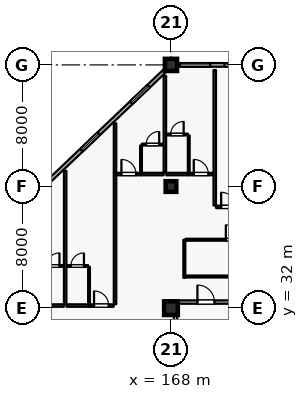
"""IFC4 building model, lengths in metres.
Left out: names, types, materials, properties, quantities, classifications, styles, units other than length and angle.
Written with IfcOpenShell. Run it as: python <this file> out.ifc"""

import sys

from ifc_helpers import new_model, si_unit, direction, frame, frame_2d, origin, origin_2d, place, context, subcontext, project, spatial, rectangle, extrude, element, fill, save


model = new_model("IFC4")
c1 = context("Model", 3, precision=1e-05, world=origin(), true_north=direction((0.0, 1.0)))
c2 = subcontext(c1, "Body", "Model", "MODEL_VIEW")
j1 = project(units=[si_unit("LENGTHUNIT", "METRE"), si_unit("PLANEANGLEUNIT", "RADIAN")], contexts=[c1])
p1 = place(None, origin())
s1 = spatial("IfcSite", under=j1, at=p1, CompositionType="ELEMENT")
p2 = place(p1, origin())
s2 = spatial("IfcBuilding", under=s1, at=p2, CompositionType="ELEMENT")
p3 = place(p2, frame((0.0, 0.0, 16.2)))
s3 = spatial("IfcBuildingStorey", under=s2, at=p3, CompositionType="ELEMENT", Elevation=16.2)
p4 = place(p3, frame((168.0, 32.0, 0.0), z_axis=(0.0, 0.0, 1.0), x_axis=(1.0, 0.0, 0.0)))
e1 = element("IfcColumn", 1, at=p4, inside=s3, PredefinedType="COLUMN", context=c2, shape_type="SweptSolid", body=[
    extrude(rectangle(XDim=0.9, YDim=0.9, at=origin_2d()), origin(), (0.0, 0.0, 1.0), 4.8),
])
p5 = place(p3, frame((168.0, 48.0, 0.0), z_axis=(0.0, 0.0, 1.0), x_axis=(1.0, 0.0, 0.0)))
e2 = element("IfcColumn", 2, at=p5, inside=s3, PredefinedType="COLUMN", context=c2, shape_type="SweptSolid", body=[
    extrude(rectangle(XDim=0.8, YDim=0.8, at=origin_2d()), origin(), (0.0, 0.0, 1.0), 4.8),
])
p6 = place(p3, frame((168.0, 40.0, 0.0), z_axis=(0.0, 0.0, 1.0), x_axis=(1.0, 0.0, 0.0)))
e3 = element("IfcColumn", 3, at=p6, inside=s3, PredefinedType="COLUMN", context=c2, shape_type="SweptSolid", body=[
    extrude(rectangle(XDim=0.7, YDim=0.7, at=origin_2d()), origin(), (0.0, 0.0, 1.0), 4.8),
])
p7 = place(p3, frame((160.0, 40.381, 0.0), z_axis=(0.0, 0.0, 1.0), x_axis=(0.724156739794, 0.689635422677, 0.0)))
e4 = element("IfcWall", 4, at=p7, inside=s3, PredefinedType="SOLIDWALL", context=c2, shape_type="SweptSolid", body=[
    extrude(rectangle(XDim=10.495, YDim=0.24, at=frame_2d((5.248, 0.0))), origin(), (0.0, 0.0, 1.0), 4.13),
])
p8 = place(p7, frame((2.901, 0.0, 0.8)))
e5 = element("IfcOpeningElement", 5, at=p8, cuts=e4, PredefinedType="OPENING", context=c2, shape_type="SweptSolid", body=[
    extrude(rectangle(XDim=1.6, YDim=1.6, at=frame_2d((0.8, 0.8))), frame((0.0, 0.13, 0.0), z_axis=(0.0, -1.0, 0.0), x_axis=(1.0, 0.0, 0.0)), (0.0, 0.0, 1.0), 0.26),
])
p9 = place(p7, frame((7.43, 0.0, 0.8)))
e6 = element("IfcOpeningElement", 6, at=p9, cuts=e4, PredefinedType="OPENING", context=c2, shape_type="SweptSolid", body=[
    extrude(rectangle(XDim=1.6, YDim=1.6, at=frame_2d((0.8, 0.8))), frame((0.0, 0.13, 0.0), z_axis=(0.0, -1.0, 0.0), x_axis=(1.0, 0.0, 0.0)), (0.0, 0.0, 1.0), 0.26),
])
p10 = place(p3, frame((168.4, 48.0, 0.0), z_axis=(0.0, 0.0, 1.0), x_axis=(1.0, 0.0, 0.0)))
e7 = element("IfcWall", 7, at=p10, inside=s3, PredefinedType="SOLIDWALL", context=c2, shape_type="SweptSolid", body=[
    extrude(rectangle(XDim=7.6, YDim=0.24, at=frame_2d((3.8, 0.0))), origin(), (0.0, 0.0, 1.0), 4.13),
])
p11 = place(p10, frame((0.19, 0.0, 0.8)))
e8 = element("IfcOpeningElement", 8, at=p11, cuts=e7, PredefinedType="OPENING", context=c2, shape_type="SweptSolid", body=[
    extrude(rectangle(XDim=2.0, YDim=1.75, at=frame_2d((1.0, 0.875))), frame((0.0, 0.13, 0.0), z_axis=(0.0, -1.0, 0.0), x_axis=(1.0, 0.0, 0.0)), (0.0, 0.0, 1.0), 0.26),
])
p12 = place(p10, frame((3.12, 0.0, 0.8)))
e9 = element("IfcOpeningElement", 9, at=p12, cuts=e7, PredefinedType="OPENING", context=c2, shape_type="SweptSolid", body=[
    extrude(rectangle(XDim=2.0, YDim=1.75, at=frame_2d((1.0, 0.875))), frame((0.0, 0.13, 0.0), z_axis=(0.0, -1.0, 0.0), x_axis=(1.0, 0.0, 0.0)), (0.0, 0.0, 1.0), 0.26),
])
p13 = place(p10, frame((6.03, 0.0, 0.8)))
e10 = element("IfcOpeningElement", 10, at=p13, cuts=e7, PredefinedType="OPENING", context=c2, shape_type="SweptSolid", body=[
    extrude(rectangle(XDim=1.4, YDim=1.6, at=frame_2d((0.7, 0.8))), frame((0.0, 0.13, 0.0), z_axis=(0.0, -1.0, 0.0), x_axis=(1.0, 0.0, 0.0)), (0.0, 0.0, 1.0), 0.26),
])
p14 = place(p3, frame((168.3, 29.365, 0.0), z_axis=(0.0, 0.0, 1.0), x_axis=(0.0, 1.0, 0.0)))
e11 = element("IfcWall", 11, at=p14, inside=s3, PredefinedType="PARTITIONING", context=c2, shape_type="SweptSolid", body=[
    extrude(rectangle(XDim=2.92, YDim=0.22, at=frame_2d((1.46, 0.0))), origin(), (0.0, 0.0, 1.0), 4.535),
])
p15 = place(p3, frame((168.19, 32.4, 0.0), z_axis=(0.0, 0.0, 1.0), x_axis=(1.0, 0.0, 0.0)))
e12 = element("IfcWall", 12, at=p15, inside=s3, PredefinedType="PARTITIONING", context=c2, shape_type="SweptSolid", body=[
    extrude(rectangle(XDim=4.22, YDim=0.22, at=frame_2d((2.11, 0.0))), origin(), (0.0, 0.0, 1.0), 4.535),
])
p16 = place(p15, frame((1.55, 0.0, 0.0)))
e13 = element("IfcOpeningElement", 13, at=p16, cuts=e12, PredefinedType="OPENING", context=c2, shape_type="SweptSolid", body=[
    extrude(rectangle(XDim=1.12, YDim=2.2, at=frame_2d((0.56, 1.1))), frame((0.0, 0.12, 0.0), z_axis=(0.0, -1.0, 0.0), x_axis=(1.0, 0.0, 0.0)), (0.0, 0.0, 1.0), 0.24),
])
p17 = place(p3, frame((159.48, 32.17, 0.0), z_axis=(0.0, 0.0, 1.0), x_axis=(1.0, 0.0, 0.0)))
e14 = element("IfcWall", 14, at=p17, inside=s3, PredefinedType="PARTITIONING", context=c2, shape_type="SweptSolid", body=[
    extrude(rectangle(XDim=1.47, YDim=0.16, at=frame_2d((0.735, 0.0))), origin(), (0.0, 0.0, 1.0), 4.535),
])
p18 = place(p3, frame((159.53, 34.77, 0.0), z_axis=(0.0, 0.0, 1.0), x_axis=(1.0, 0.0, 0.0)))
e15 = element("IfcWall", 15, at=p18, inside=s3, PredefinedType="PARTITIONING", context=c2, shape_type="SweptSolid", body=[
    extrude(rectangle(XDim=1.41, YDim=0.115, at=frame_2d((0.705, 0.0))), origin(), (0.0, 0.0, 1.0), 4.535),
])
p19 = place(p18, frame((0.275, 0.0, 0.0)))
e16 = element("IfcOpeningElement", 16, at=p19, cuts=e15, PredefinedType="OPENING", context=c2, shape_type="SweptSolid", body=[
    extrude(rectangle(XDim=0.86, YDim=2.12, at=frame_2d((0.43, 1.06))), frame((0.0, 0.067, 0.0), z_axis=(0.0, -1.0, 0.0), x_axis=(1.0, 0.0, 0.0)), (0.0, 0.0, 1.0), 0.135),
])
p20 = place(p3, frame((161.13, 32.17, 0.0), z_axis=(0.0, 0.0, 1.0), x_axis=(1.0, 0.0, 0.0)))
e17 = element("IfcWall", 17, at=p20, inside=s3, PredefinedType="PARTITIONING", context=c2, shape_type="SweptSolid", body=[
    extrude(rectangle(XDim=1.47, YDim=0.16, at=frame_2d((0.735, 0.0))), origin(), (0.0, 0.0, 1.0), 4.535),
])
p21 = place(p3, frame((162.61, 32.17, 0.0), z_axis=(0.0, 0.0, 1.0), x_axis=(1.0, 0.0, 0.0)))
e18 = element("IfcWall", 18, at=p21, inside=s3, PredefinedType="PARTITIONING", context=c2, shape_type="SweptSolid", body=[
    extrude(rectangle(XDim=1.62, YDim=0.16, at=frame_2d((0.81, 0.0))), origin(), (0.0, 0.0, 1.0), 4.535),
])
p22 = place(p21, frame((0.33, 0.0, 0.0)))
e19 = element("IfcOpeningElement", 19, at=p22, cuts=e18, PredefinedType="OPENING", context=c2, shape_type="SweptSolid", body=[
    extrude(rectangle(XDim=0.96, YDim=2.2, at=frame_2d((0.48, 1.1))), frame((0.0, 0.09, 0.0), z_axis=(0.0, -1.0, 0.0), x_axis=(1.0, 0.0, 0.0)), (0.0, 0.0, 1.0), 0.18),
])
p23 = place(p3, frame((162.61, 32.26, 0.0), z_axis=(0.0, 0.0, 1.0), x_axis=(0.0, 1.0, 0.0)))
e20 = element("IfcWall", 20, at=p23, inside=s3, PredefinedType="PARTITIONING", context=c2, shape_type="SweptSolid", body=[
    extrude(rectangle(XDim=2.45, YDim=0.115, at=frame_2d((1.225, 0.0))), origin(), (0.0, 0.0, 1.0), 4.535),
])
p24 = place(p3, frame((161.14, 34.77, 0.0), z_axis=(0.0, 0.0, 1.0), x_axis=(1.0, 0.0, 0.0)))
e21 = element("IfcWall", 21, at=p24, inside=s3, PredefinedType="PARTITIONING", context=c2, shape_type="SweptSolid", body=[
    extrude(rectangle(XDim=1.41, YDim=0.115, at=frame_2d((0.705, 0.0))), origin(), (0.0, 0.0, 1.0), 4.535),
])
p25 = place(p24, frame((0.275, 0.0, 0.0)))
e22 = element("IfcOpeningElement", 22, at=p25, cuts=e21, PredefinedType="OPENING", context=c2, shape_type="SweptSolid", body=[
    extrude(rectangle(XDim=0.86, YDim=2.12, at=frame_2d((0.43, 1.06))), frame((0.0, 0.067, 0.0), z_axis=(0.0, -1.0, 0.0), x_axis=(1.0, 0.0, 0.0)), (0.0, 0.0, 1.0), 0.135),
])
p26 = place(p3, frame((161.04, 32.26, 0.0), z_axis=(0.0, 0.0, 1.0), x_axis=(0.0, 1.0, 0.0)))
e23 = element("IfcWall", 23, at=p26, inside=s3, PredefinedType="PARTITIONING", context=c2, shape_type="SweptSolid", body=[
    extrude(rectangle(XDim=8.77, YDim=0.16, at=frame_2d((4.385, 0.0))), origin(), (0.0, 0.0, 1.0), 4.535),
])
p27 = place(p3, frame((164.32, 32.26, 0.0), z_axis=(0.0, 0.0, 1.0), x_axis=(0.0, 1.0, 0.0)))
e24 = element("IfcWall", 24, at=p27, inside=s3, PredefinedType="PARTITIONING", context=c2, shape_type="SweptSolid", body=[
    extrude(rectangle(XDim=8.64, YDim=0.16, at=frame_2d((4.32, 0.0))), origin(), (0.0, 0.0, 1.0), 4.535),
])
p28 = place(p3, frame((164.41, 40.82, 0.0), z_axis=(0.0, 0.0, 1.0), x_axis=(1.0, 0.0, 0.0)))
e25 = element("IfcWall", 25, at=p28, inside=s3, PredefinedType="PARTITIONING", context=c2, shape_type="SweptSolid", body=[
    extrude(rectangle(XDim=1.62, YDim=0.16, at=frame_2d((0.81, 0.0))), origin(), (0.0, 0.0, 1.0), 4.535),
])
p29 = place(p28, frame((0.33, 0.0, 0.0)))
e26 = element("IfcOpeningElement", 26, at=p29, cuts=e25, PredefinedType="OPENING", context=c2, shape_type="SweptSolid", body=[
    extrude(rectangle(XDim=0.96, YDim=2.2, at=frame_2d((0.48, 1.1))), frame((0.0, 0.09, 0.0), z_axis=(0.0, -1.0, 0.0), x_axis=(1.0, 0.0, 0.0)), (0.0, 0.0, 1.0), 0.18),
])
p30 = place(p3, frame((166.04, 40.82, 0.0), z_axis=(0.0, 0.0, 1.0), x_axis=(1.0, 0.0, 0.0)))
e27 = element("IfcWall", 27, at=p30, inside=s3, PredefinedType="PARTITIONING", context=c2, shape_type="SweptSolid", body=[
    extrude(rectangle(XDim=1.47, YDim=0.16, at=frame_2d((0.735, 0.0))), origin(), (0.0, 0.0, 1.0), 4.535),
])
p31 = place(p3, frame((166.03, 40.91, 0.0), z_axis=(0.0, 0.0, 1.0), x_axis=(0.0, 1.0, 0.0)))
e28 = element("IfcWall", 28, at=p31, inside=s3, PredefinedType="PARTITIONING", context=c2, shape_type="SweptSolid", body=[
    extrude(rectangle(XDim=1.79, YDim=0.115, at=frame_2d((0.895, 0.0))), origin(), (0.0, 0.0, 1.0), 4.535),
])
p32 = place(p3, frame((166.09, 42.76, 0.0), z_axis=(0.0, 0.0, 1.0), x_axis=(1.0, 0.0, 0.0)))
e29 = element("IfcWall", 29, at=p32, inside=s3, PredefinedType="PARTITIONING", context=c2, shape_type="SweptSolid", body=[
    extrude(rectangle(XDim=1.41, YDim=0.115, at=frame_2d((0.705, 0.0))), origin(), (0.0, 0.0, 1.0), 4.535),
])
p33 = place(p32, frame((0.275, 0.0, 0.0)))
e30 = element("IfcOpeningElement", 30, at=p33, cuts=e29, PredefinedType="OPENING", context=c2, shape_type="SweptSolid", body=[
    extrude(rectangle(XDim=0.86, YDim=2.12, at=frame_2d((0.43, 1.06))), frame((0.0, 0.067, 0.0), z_axis=(0.0, -1.0, 0.0), x_axis=(1.0, 0.0, 0.0)), (0.0, 0.0, 1.0), 0.135),
])
p34 = place(p3, frame((164.32, 40.91, 0.0), z_axis=(0.0, 0.0, 1.0), x_axis=(0.0, 1.0, 0.0)))
e31 = element("IfcWall", 31, at=p34, inside=s3, PredefinedType="PARTITIONING", context=c2, shape_type="SweptSolid", body=[
    extrude(rectangle(XDim=3.25, YDim=0.16, at=frame_2d((1.625, 0.0))), origin(), (0.0, 0.0, 1.0), 4.535),
])
p35 = place(p3, frame((167.69, 40.82, 0.0), z_axis=(0.0, 0.0, 1.0), x_axis=(1.0, 0.0, 0.0)))
e32 = element("IfcWall", 32, at=p35, inside=s3, PredefinedType="PARTITIONING", context=c2, shape_type="SweptSolid", body=[
    extrude(rectangle(XDim=1.47, YDim=0.16, at=frame_2d((0.735, 0.0))), origin(), (0.0, 0.0, 1.0), 4.535),
])
p36 = place(p3, frame((169.17, 40.82, 0.0), z_axis=(0.0, 0.0, 1.0), x_axis=(1.0, 0.0, 0.0)))
e33 = element("IfcWall", 33, at=p36, inside=s3, PredefinedType="PARTITIONING", context=c2, shape_type="SweptSolid", body=[
    extrude(rectangle(XDim=1.62, YDim=0.16, at=frame_2d((0.81, 0.0))), origin(), (0.0, 0.0, 1.0), 4.535),
])
p37 = place(p36, frame((0.33, 0.0, 0.0)))
e34 = element("IfcOpeningElement", 34, at=p37, cuts=e33, PredefinedType="OPENING", context=c2, shape_type="SweptSolid", body=[
    extrude(rectangle(XDim=0.96, YDim=2.2, at=frame_2d((0.48, 1.1))), frame((0.0, 0.09, 0.0), z_axis=(0.0, -1.0, 0.0), x_axis=(1.0, 0.0, 0.0)), (0.0, 0.0, 1.0), 0.18),
])
p38 = place(p3, frame((169.17, 40.91, 0.0), z_axis=(0.0, 0.0, 1.0), x_axis=(0.0, 1.0, 0.0)))
e35 = element("IfcWall", 35, at=p38, inside=s3, PredefinedType="PARTITIONING", context=c2, shape_type="SweptSolid", body=[
    extrude(rectangle(XDim=2.45, YDim=0.115, at=frame_2d((1.225, 0.0))), origin(), (0.0, 0.0, 1.0), 4.535),
])
p39 = place(p3, frame((167.7, 43.42, 0.0), z_axis=(0.0, 0.0, 1.0), x_axis=(1.0, 0.0, 0.0)))
e36 = element("IfcWall", 36, at=p39, inside=s3, PredefinedType="PARTITIONING", context=c2, shape_type="SweptSolid", body=[
    extrude(rectangle(XDim=1.41, YDim=0.115, at=frame_2d((0.705, 0.0))), origin(), (0.0, 0.0, 1.0), 4.535),
])
p40 = place(p39, frame((0.275, 0.0, 0.0)))
e37 = element("IfcOpeningElement", 37, at=p40, cuts=e36, PredefinedType="OPENING", context=c2, shape_type="SweptSolid", body=[
    extrude(rectangle(XDim=0.86, YDim=2.12, at=frame_2d((0.43, 1.06))), frame((0.0, 0.067, 0.0), z_axis=(0.0, -1.0, 0.0), x_axis=(1.0, 0.0, 0.0)), (0.0, 0.0, 1.0), 0.135),
])
p41 = place(p3, frame((167.6, 40.91, 0.0), z_axis=(0.0, 0.0, 1.0), x_axis=(0.0, 1.0, 0.0)))
e38 = element("IfcWall", 38, at=p41, inside=s3, PredefinedType="PARTITIONING", context=c2, shape_type="SweptSolid", body=[
    extrude(rectangle(XDim=6.37, YDim=0.16, at=frame_2d((3.185, 0.0))), origin(), (0.0, 0.0, 1.0), 4.535),
])
p42 = place(p3, frame((170.97, 38.66, 0.0), z_axis=(0.0, 0.0, 1.0), x_axis=(1.0, 0.0, 0.0)))
e39 = element("IfcWall", 39, at=p42, inside=s3, PredefinedType="PARTITIONING", context=c2, shape_type="SweptSolid", body=[
    extrude(rectangle(XDim=1.62, YDim=0.16, at=frame_2d((0.81, 0.0))), origin(), (0.0, 0.0, 1.0), 4.535),
])
p43 = place(p42, frame((0.33, 0.0, 0.0)))
e40 = element("IfcOpeningElement", 40, at=p43, cuts=e39, PredefinedType="OPENING", context=c2, shape_type="SweptSolid", body=[
    extrude(rectangle(XDim=0.96, YDim=2.2, at=frame_2d((0.48, 1.1))), frame((0.0, 0.09, 0.0), z_axis=(0.0, -1.0, 0.0), x_axis=(1.0, 0.0, 0.0)), (0.0, 0.0, 1.0), 0.18),
])
p44 = place(p3, frame((170.88, 38.75, 0.0), z_axis=(0.0, 0.0, 1.0), x_axis=(0.0, 1.0, 0.0)))
e41 = element("IfcWall", 41, at=p44, inside=s3, PredefinedType="PARTITIONING", context=c2, shape_type="SweptSolid", body=[
    extrude(rectangle(XDim=8.91, YDim=0.16, at=frame_2d((4.455, 0.0))), origin(), (0.0, 0.0, 1.0), 4.535),
])
p45 = place(p3, frame((168.96, 36.5, 0.0), z_axis=(0.0, 0.0, 1.0), x_axis=(1.0, 0.0, 0.0)))
e42 = element("IfcWall", 42, at=p45, inside=s3, PredefinedType="PARTITIONING", context=c2, shape_type="SweptSolid", body=[
    extrude(rectangle(XDim=6.28, YDim=0.125, at=frame_2d((3.14, 0.0))), origin(), (0.0, 0.0, 1.0), 4.535),
])
p46 = place(p45, frame((2.65, 0.0, 0.0)))
e43 = element("IfcOpeningElement", 43, at=p46, cuts=e42, PredefinedType="OPENING", context=c2, shape_type="SweptSolid", body=[
    extrude(rectangle(XDim=0.98, YDim=2.15, at=frame_2d((0.49, 1.075))), frame((0.0, 0.073, 0.0), z_axis=(0.0, -1.0, 0.0), x_axis=(1.0, 0.0, 0.0)), (0.0, 0.0, 1.0), 0.145),
])
p47 = place(p3, frame((168.88, 34.0, 0.0), z_axis=(0.0, 0.0, 1.0), x_axis=(0.0, 1.0, 0.0)))
e44 = element("IfcWall", 44, at=p47, inside=s3, PredefinedType="PARTITIONING", context=c2, shape_type="SweptSolid", body=[
    extrude(rectangle(XDim=2.496, YDim=0.125, at=frame_2d((1.248, 0.0))), origin(), (0.0, 0.0, 1.0), 4.535),
])
p48 = place(p3, frame((168.943, 34.08, 0.0), z_axis=(0.0, 0.0, 1.0), x_axis=(1.0, 0.0, 0.0)))
e45 = element("IfcWall", 45, at=p48, inside=s3, PredefinedType="PARTITIONING", context=c2, shape_type="SweptSolid", body=[
    extrude(rectangle(XDim=6.314, YDim=0.125, at=frame_2d((3.157, 0.0))), origin(), (0.0, 0.0, 1.0), 4.535),
])
p49 = place(p8, origin())
e46 = element("IfcWindow", 46, at=p49, inside=s3, PartitioningType="SINGLE_PANEL", PredefinedType="WINDOW", context=c2, shape_type="SweptSolid", body=[
    extrude(rectangle(XDim=1.6, YDim=1.6, at=frame_2d((0.8, 0.8))), frame((0.0, 0.03, 0.0), z_axis=(0.0, -1.0, 0.0), x_axis=(1.0, 0.0, 0.0)), (0.0, 0.0, 1.0), 0.06),
])
fill(e5, e46)
p50 = place(p9, origin())
e47 = element("IfcWindow", 47, at=p50, inside=s3, PartitioningType="SINGLE_PANEL", PredefinedType="WINDOW", context=c2, shape_type="SweptSolid", body=[
    extrude(rectangle(XDim=1.6, YDim=1.6, at=frame_2d((0.8, 0.8))), frame((0.0, 0.03, 0.0), z_axis=(0.0, -1.0, 0.0), x_axis=(1.0, 0.0, 0.0)), (0.0, 0.0, 1.0), 0.06),
])
fill(e6, e47)
p51 = place(p11, origin())
e48 = element("IfcWindow", 48, at=p51, inside=s3, PartitioningType="DOUBLE_PANEL_VERTICAL", PredefinedType="WINDOW", context=c2, shape_type="SweptSolid", body=[
    extrude(rectangle(XDim=2.0, YDim=1.75, at=frame_2d((1.0, 0.875))), frame((0.0, 0.03, 0.0), z_axis=(0.0, -1.0, 0.0), x_axis=(1.0, 0.0, 0.0)), (0.0, 0.0, 1.0), 0.06),
])
fill(e8, e48)
p52 = place(p12, origin())
e49 = element("IfcWindow", 49, at=p52, inside=s3, PartitioningType="DOUBLE_PANEL_VERTICAL", PredefinedType="WINDOW", context=c2, shape_type="SweptSolid", body=[
    extrude(rectangle(XDim=2.0, YDim=1.75, at=frame_2d((1.0, 0.875))), frame((0.0, 0.03, 0.0), z_axis=(0.0, -1.0, 0.0), x_axis=(1.0, 0.0, 0.0)), (0.0, 0.0, 1.0), 0.06),
])
fill(e9, e49)
p53 = place(p16, origin())
e50 = element("IfcDoor", 50, at=p53, inside=s3, OperationType="SINGLE_SWING_LEFT", PredefinedType="DOOR", context=c2, shape_type="SweptSolid", body=[
    extrude(rectangle(XDim=1.12, YDim=2.2, at=frame_2d((0.56, 1.1))), frame((0.0, 0.025, 0.0), z_axis=(0.0, -1.0, 0.0), x_axis=(1.0, 0.0, 0.0)), (0.0, 0.0, 1.0), 0.05),
])
fill(e13, e50)
p54 = place(p19, origin())
e51 = element("IfcDoor", 51, at=p54, inside=s3, OperationType="SINGLE_SWING_RIGHT", PredefinedType="DOOR", context=c2, shape_type="SweptSolid", body=[
    extrude(rectangle(XDim=0.86, YDim=2.12, at=frame_2d((0.43, 1.06))), frame((0.0, 0.025, 0.0), z_axis=(0.0, -1.0, 0.0), x_axis=(1.0, 0.0, 0.0)), (0.0, 0.0, 1.0), 0.05),
])
fill(e16, e51)
p55 = place(p22, origin())
e52 = element("IfcDoor", 52, at=p55, inside=s3, OperationType="SINGLE_SWING_LEFT", PredefinedType="DOOR", context=c2, shape_type="SweptSolid", body=[
    extrude(rectangle(XDim=0.96, YDim=2.2, at=frame_2d((0.48, 1.1))), frame((0.0, 0.025, 0.0), z_axis=(0.0, -1.0, 0.0), x_axis=(1.0, 0.0, 0.0)), (0.0, 0.0, 1.0), 0.05),
])
fill(e19, e52)
p56 = place(p25, origin())
e53 = element("IfcDoor", 53, at=p56, inside=s3, OperationType="SINGLE_SWING_RIGHT", PredefinedType="DOOR", context=c2, shape_type="SweptSolid", body=[
    extrude(rectangle(XDim=0.86, YDim=2.12, at=frame_2d((0.43, 1.06))), frame((0.0, 0.025, 0.0), z_axis=(0.0, -1.0, 0.0), x_axis=(1.0, 0.0, 0.0)), (0.0, 0.0, 1.0), 0.05),
])
fill(e22, e53)
p57 = place(p29, origin())
e54 = element("IfcDoor", 54, at=p57, inside=s3, OperationType="SINGLE_SWING_LEFT", PredefinedType="DOOR", context=c2, shape_type="SweptSolid", body=[
    extrude(rectangle(XDim=0.96, YDim=2.2, at=frame_2d((0.48, 1.1))), frame((0.0, 0.025, 0.0), z_axis=(0.0, -1.0, 0.0), x_axis=(1.0, 0.0, 0.0)), (0.0, 0.0, 1.0), 0.05),
])
fill(e26, e54)
p58 = place(p33, origin())
e55 = element("IfcDoor", 55, at=p58, inside=s3, OperationType="SINGLE_SWING_RIGHT", PredefinedType="DOOR", context=c2, shape_type="SweptSolid", body=[
    extrude(rectangle(XDim=0.86, YDim=2.12, at=frame_2d((0.43, 1.06))), frame((0.0, 0.025, 0.0), z_axis=(0.0, -1.0, 0.0), x_axis=(1.0, 0.0, 0.0)), (0.0, 0.0, 1.0), 0.05),
])
fill(e30, e55)
p59 = place(p37, origin())
e56 = element("IfcDoor", 56, at=p59, inside=s3, OperationType="SINGLE_SWING_LEFT", PredefinedType="DOOR", context=c2, shape_type="SweptSolid", body=[
    extrude(rectangle(XDim=0.96, YDim=2.2, at=frame_2d((0.48, 1.1))), frame((0.0, 0.025, 0.0), z_axis=(0.0, -1.0, 0.0), x_axis=(1.0, 0.0, 0.0)), (0.0, 0.0, 1.0), 0.05),
])
fill(e34, e56)
p60 = place(p40, origin())
e57 = element("IfcDoor", 57, at=p60, inside=s3, OperationType="SINGLE_SWING_RIGHT", PredefinedType="DOOR", context=c2, shape_type="SweptSolid", body=[
    extrude(rectangle(XDim=0.86, YDim=2.12, at=frame_2d((0.43, 1.06))), frame((0.0, 0.025, 0.0), z_axis=(0.0, -1.0, 0.0), x_axis=(1.0, 0.0, 0.0)), (0.0, 0.0, 1.0), 0.05),
])
fill(e37, e57)
p61 = place(p43, origin())
e58 = element("IfcDoor", 58, at=p61, inside=s3, OperationType="SINGLE_SWING_LEFT", PredefinedType="DOOR", context=c2, shape_type="SweptSolid", body=[
    extrude(rectangle(XDim=0.96, YDim=2.2, at=frame_2d((0.48, 1.1))), frame((0.0, 0.025, 0.0), z_axis=(0.0, -1.0, 0.0), x_axis=(1.0, 0.0, 0.0)), (0.0, 0.0, 1.0), 0.05),
])
fill(e40, e58)
p62 = place(p46, origin())
e59 = element("IfcDoor", 59, at=p62, inside=s3, OperationType="SINGLE_SWING_LEFT", PredefinedType="DOOR", context=c2, shape_type="SweptSolid", body=[
    extrude(rectangle(XDim=0.98, YDim=2.15, at=frame_2d((0.49, 1.075))), frame((0.0, 0.025, 0.0), z_axis=(0.0, -1.0, 0.0), x_axis=(1.0, 0.0, 0.0)), (0.0, 0.0, 1.0), 0.05),
])
fill(e43, e59)
save(model, sys.argv[1])
